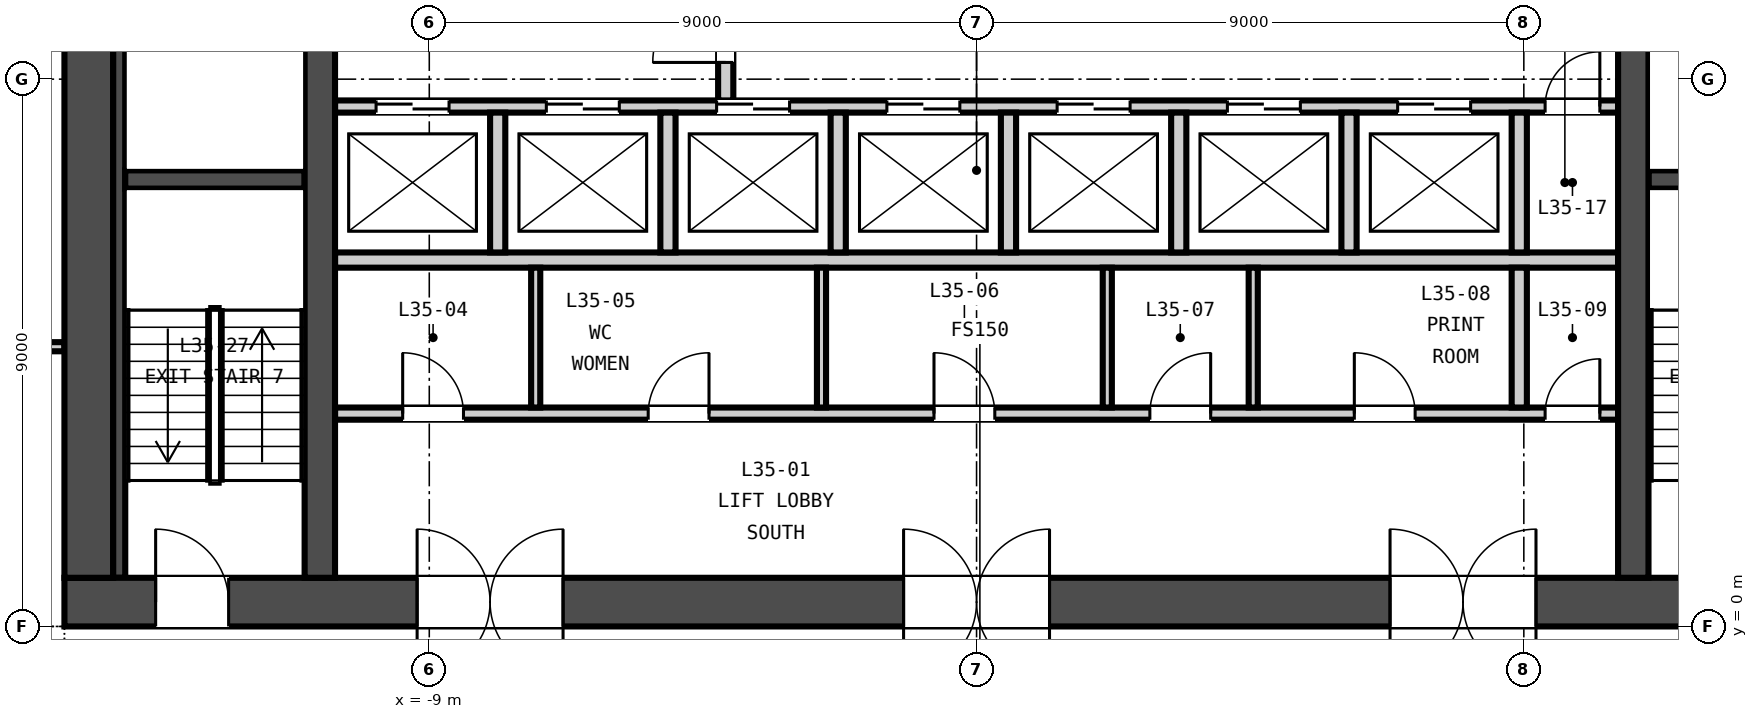
"""IFC4 building model, lengths in metres.
Left out: names, types, materials, properties, quantities, classifications, styles, units other than length and angle.
Written with IfcOpenShell. Run it as: python <this file> out.ifc"""

import sys

from ifc_helpers import new_model, si_unit, direction, frame, frame_2d, origin, place, context, subcontext, project, spatial, rectangle, extrude, element, fill, save


model = new_model("IFC4")
c1 = context("Model", 3, precision=1e-05, world=origin(), true_north=direction((0.0, 1.0)))
c2 = subcontext(c1, "Body", "Model", "MODEL_VIEW")
j1 = project(units=[si_unit("LENGTHUNIT", "METRE"), si_unit("PLANEANGLEUNIT", "RADIAN")], contexts=[c1])
p1 = place(None, origin())
s1 = spatial("IfcSite", under=j1, at=p1, CompositionType="ELEMENT")
p2 = place(p1, origin())
s2 = spatial("IfcBuilding", under=s1, at=p2, CompositionType="ELEMENT")
p3 = place(p2, frame((0.0, 0.0, 144.4)))
s3 = spatial("IfcBuildingStorey", under=s2, at=p3, CompositionType="ELEMENT", Elevation=144.4)
p4 = place(p3, frame((-15.0, 0.4, -0.15), z_axis=(0.0, 0.0, 1.0), x_axis=(1.0, 0.0, 0.0)))
e1 = element("IfcWall", 1, at=p4, inside=s3, PredefinedType="SOLIDWALL", context=c2, shape_type="SweptSolid", body=[
    extrude(rectangle(XDim=30.0, YDim=0.8, at=frame_2d((15.0, 0.0))), origin(), (0.0, 0.0, 1.0), 3.65),
])
p5 = place(p4, frame((5.8, 0.0, 0.15)))
e2 = element("IfcOpeningElement", 2, at=p5, cuts=e1, PredefinedType="OPENING", context=c2, shape_type="SweptSolid", body=[
    extrude(rectangle(XDim=2.4, YDim=2.4, at=frame_2d((1.2, 1.2))), frame((0.0, 0.41, 0.0), z_axis=(0.0, -1.0, 0.0), x_axis=(1.0, 0.0, 0.0)), (0.0, 0.0, 1.0), 0.82),
])
p6 = place(p4, frame((13.8, 0.0, 0.15)))
e3 = element("IfcOpeningElement", 3, at=p6, cuts=e1, PredefinedType="OPENING", context=c2, shape_type="SweptSolid", body=[
    extrude(rectangle(XDim=2.4, YDim=2.4, at=frame_2d((1.2, 1.2))), frame((0.0, 0.41, 0.0), z_axis=(0.0, -1.0, 0.0), x_axis=(1.0, 0.0, 0.0)), (0.0, 0.0, 1.0), 0.82),
])
p7 = place(p4, frame((21.8, 0.0, 0.15)))
e4 = element("IfcOpeningElement", 4, at=p7, cuts=e1, PredefinedType="OPENING", context=c2, shape_type="SweptSolid", body=[
    extrude(rectangle(XDim=2.4, YDim=2.4, at=frame_2d((1.2, 1.2))), frame((0.0, 0.41, 0.0), z_axis=(0.0, -1.0, 0.0), x_axis=(1.0, 0.0, 0.0)), (0.0, 0.0, 1.0), 0.82),
])
p8 = place(p4, frame((1.5, 0.0, 0.15)))
e5 = element("IfcOpeningElement", 5, at=p8, cuts=e1, PredefinedType="OPENING", context=c2, shape_type="SweptSolid", body=[
    extrude(rectangle(XDim=1.2, YDim=2.1, at=frame_2d((0.6, 1.05))), frame((0.0, 0.41, 0.0), z_axis=(0.0, -1.0, 0.0), x_axis=(1.0, 0.0, 0.0)), (0.0, 0.0, 1.0), 0.82),
])
p9 = place(p4, frame((27.3, 0.0, 0.15)))
e6 = element("IfcOpeningElement", 6, at=p9, cuts=e1, PredefinedType="OPENING", context=c2, shape_type="SweptSolid", body=[
    extrude(rectangle(XDim=1.2, YDim=2.1, at=frame_2d((0.6, 1.05))), frame((0.0, 0.41, 0.0), z_axis=(0.0, -1.0, 0.0), x_axis=(1.0, 0.0, 0.0)), (0.0, 0.0, 1.0), 0.82),
])
p10 = place(p3, frame((-14.6, 0.8, -0.15), z_axis=(0.0, 0.0, 1.0), x_axis=(0.0, 1.0, 0.0)))
e7 = element("IfcWall", 7, at=p10, inside=s3, PredefinedType="SOLIDWALL", context=c2, shape_type="SweptSolid", body=[
    extrude(rectangle(XDim=13.4, YDim=0.8, at=frame_2d((6.7, 0.0))), origin(), (0.0, 0.0, 1.0), 3.65),
])
for number, where, z_axis, x_axis in (
    (8, (-10.8, 0.8, -0.15), (0.0, 0.0, 1.0), (0.0, 1.0, 0.0)),
    (9, (10.8, 0.8, -0.15), (0.0, 0.0, 1.0), (0.0, 1.0, 0.0)),
):
    element("IfcWall", number, at=place(p3, frame(where, z_axis=z_axis, x_axis=x_axis)), inside=s3, PredefinedType="SOLIDWALL", context=c2, shape_type="SweptSolid", body=[
        extrude(rectangle(XDim=13.4, YDim=0.5, at=frame_2d((6.7, 0.0))), origin(), (0.0, 0.0, 1.0), 3.65),
    ])
p11 = place(p3, frame((-10.55, 3.5, 0.0), z_axis=(0.0, 0.0, 1.0), x_axis=(1.0, 0.0, 0.0)))
e10 = element("IfcWall", 10, at=p11, inside=s3, PredefinedType="PARTITIONING", context=c2, shape_type="SweptSolid", body=[
    extrude(rectangle(XDim=21.1, YDim=0.2, at=frame_2d((10.55, 0.0))), origin(), (0.0, 0.0, 1.0), 3.5),
])
p12 = place(p11, frame((1.113, 0.0, 0.0)))
e11 = element("IfcOpeningElement", 11, at=p12, cuts=e10, PredefinedType="OPENING", context=c2, shape_type="SweptSolid", body=[
    extrude(rectangle(XDim=1.0, YDim=2.1, at=frame_2d((0.5, 1.05))), frame((0.0, 0.11, 0.0), z_axis=(0.0, -1.0, 0.0), x_axis=(1.0, 0.0, 0.0)), (0.0, 0.0, 1.0), 0.22),
])
p13 = place(p11, frame((5.15, 0.0, 0.0)))
e12 = element("IfcOpeningElement", 12, at=p13, cuts=e10, PredefinedType="OPENING", context=c2, shape_type="SweptSolid", body=[
    extrude(rectangle(XDim=1.0, YDim=2.1, at=frame_2d((0.5, 1.05))), frame((0.0, 0.11, 0.0), z_axis=(0.0, -1.0, 0.0), x_axis=(1.0, 0.0, 0.0)), (0.0, 0.0, 1.0), 0.22),
])
p14 = place(p11, frame((9.85, 0.0, 0.0)))
e13 = element("IfcOpeningElement", 13, at=p14, cuts=e10, PredefinedType="OPENING", context=c2, shape_type="SweptSolid", body=[
    extrude(rectangle(XDim=1.0, YDim=2.1, at=frame_2d((0.5, 1.05))), frame((0.0, 0.11, 0.0), z_axis=(0.0, -1.0, 0.0), x_axis=(1.0, 0.0, 0.0)), (0.0, 0.0, 1.0), 0.22),
])
p15 = place(p11, frame((13.4, 0.0, 0.0)))
e14 = element("IfcOpeningElement", 14, at=p15, cuts=e10, PredefinedType="OPENING", context=c2, shape_type="SweptSolid", body=[
    extrude(rectangle(XDim=1.0, YDim=2.1, at=frame_2d((0.5, 1.05))), frame((0.0, 0.11, 0.0), z_axis=(0.0, -1.0, 0.0), x_axis=(1.0, 0.0, 0.0)), (0.0, 0.0, 1.0), 0.22),
])
p16 = place(p11, frame((16.762, 0.0, 0.0)))
e15 = element("IfcOpeningElement", 15, at=p16, cuts=e10, PredefinedType="OPENING", context=c2, shape_type="SweptSolid", body=[
    extrude(rectangle(XDim=1.0, YDim=2.1, at=frame_2d((0.5, 1.05))), frame((0.0, 0.11, 0.0), z_axis=(0.0, -1.0, 0.0), x_axis=(1.0, 0.0, 0.0)), (0.0, 0.0, 1.0), 0.22),
])
p17 = place(p11, frame((19.9, 0.0, 0.0)))
e16 = element("IfcOpeningElement", 16, at=p17, cuts=e10, PredefinedType="OPENING", context=c2, shape_type="SweptSolid", body=[
    extrude(rectangle(XDim=0.9, YDim=2.1, at=frame_2d((0.45, 1.05))), frame((0.0, 0.11, 0.0), z_axis=(0.0, -1.0, 0.0), x_axis=(1.0, 0.0, 0.0)), (0.0, 0.0, 1.0), 0.22),
])
p18 = place(p3, frame((-10.55, 6.025, 0.0), z_axis=(0.0, 0.0, 1.0), x_axis=(1.0, 0.0, 0.0)))
e17 = element("IfcWall", 17, at=p18, inside=s3, PredefinedType="PARTITIONING", context=c2, shape_type="SweptSolid", body=[
    extrude(rectangle(XDim=21.1, YDim=0.25, at=frame_2d((10.55, 0.0))), origin(), (0.0, 0.0, 1.0), 3.5),
])
p19 = place(p3, frame((-10.55, 8.55, 0.0), z_axis=(0.0, 0.0, 1.0), x_axis=(1.0, 0.0, 0.0)))
e18 = element("IfcWall", 18, at=p19, inside=s3, PredefinedType="PARTITIONING", context=c2, shape_type="SweptSolid", body=[
    extrude(rectangle(XDim=21.1, YDim=0.2, at=frame_2d((10.55, 0.0))), origin(), (0.0, 0.0, 1.0), 3.5),
])
p20 = place(p19, frame((0.675, 0.0, 0.0)))
e19 = element("IfcOpeningElement", 19, at=p20, cuts=e18, PredefinedType="OPENING", context=c2, shape_type="SweptSolid", body=[
    extrude(rectangle(XDim=1.2, YDim=2.1, at=frame_2d((0.6, 1.05))), frame((0.0, 0.11, 0.0), z_axis=(0.0, -1.0, 0.0), x_axis=(1.0, 0.0, 0.0)), (0.0, 0.0, 1.0), 0.22),
])
p21 = place(p19, frame((3.475, 0.0, 0.0)))
e20 = element("IfcOpeningElement", 20, at=p21, cuts=e18, PredefinedType="OPENING", context=c2, shape_type="SweptSolid", body=[
    extrude(rectangle(XDim=1.2, YDim=2.1, at=frame_2d((0.6, 1.05))), frame((0.0, 0.11, 0.0), z_axis=(0.0, -1.0, 0.0), x_axis=(1.0, 0.0, 0.0)), (0.0, 0.0, 1.0), 0.22),
])
p22 = place(p19, frame((6.275, 0.0, 0.0)))
e21 = element("IfcOpeningElement", 21, at=p22, cuts=e18, PredefinedType="OPENING", context=c2, shape_type="SweptSolid", body=[
    extrude(rectangle(XDim=1.2, YDim=2.1, at=frame_2d((0.6, 1.05))), frame((0.0, 0.11, 0.0), z_axis=(0.0, -1.0, 0.0), x_axis=(1.0, 0.0, 0.0)), (0.0, 0.0, 1.0), 0.22),
])
p23 = place(p19, frame((9.075, 0.0, 0.0)))
e22 = element("IfcOpeningElement", 22, at=p23, cuts=e18, PredefinedType="OPENING", context=c2, shape_type="SweptSolid", body=[
    extrude(rectangle(XDim=1.2, YDim=2.1, at=frame_2d((0.6, 1.05))), frame((0.0, 0.11, 0.0), z_axis=(0.0, -1.0, 0.0), x_axis=(1.0, 0.0, 0.0)), (0.0, 0.0, 1.0), 0.22),
])
p24 = place(p19, frame((11.875, 0.0, 0.0)))
e23 = element("IfcOpeningElement", 23, at=p24, cuts=e18, PredefinedType="OPENING", context=c2, shape_type="SweptSolid", body=[
    extrude(rectangle(XDim=1.2, YDim=2.1, at=frame_2d((0.6, 1.05))), frame((0.0, 0.11, 0.0), z_axis=(0.0, -1.0, 0.0), x_axis=(1.0, 0.0, 0.0)), (0.0, 0.0, 1.0), 0.22),
])
p25 = place(p19, frame((14.675, 0.0, 0.0)))
e24 = element("IfcOpeningElement", 24, at=p25, cuts=e18, PredefinedType="OPENING", context=c2, shape_type="SweptSolid", body=[
    extrude(rectangle(XDim=1.2, YDim=2.1, at=frame_2d((0.6, 1.05))), frame((0.0, 0.11, 0.0), z_axis=(0.0, -1.0, 0.0), x_axis=(1.0, 0.0, 0.0)), (0.0, 0.0, 1.0), 0.22),
])
p26 = place(p19, frame((17.475, 0.0, 0.0)))
e25 = element("IfcOpeningElement", 25, at=p26, cuts=e18, PredefinedType="OPENING", context=c2, shape_type="SweptSolid", body=[
    extrude(rectangle(XDim=1.2, YDim=2.1, at=frame_2d((0.6, 1.05))), frame((0.0, 0.11, 0.0), z_axis=(0.0, -1.0, 0.0), x_axis=(1.0, 0.0, 0.0)), (0.0, 0.0, 1.0), 0.22),
])
p27 = place(p19, frame((19.9, 0.0, 0.0)))
e26 = element("IfcOpeningElement", 26, at=p27, cuts=e18, PredefinedType="OPENING", context=c2, shape_type="SweptSolid", body=[
    extrude(rectangle(XDim=0.9, YDim=2.1, at=frame_2d((0.45, 1.05))), frame((0.0, 0.11, 0.0), z_axis=(0.0, -1.0, 0.0), x_axis=(1.0, 0.0, 0.0)), (0.0, 0.0, 1.0), 0.22),
])
p28 = place(p3, frame((-4.125, 8.65, 0.0), z_axis=(0.0, 0.0, 1.0), x_axis=(0.0, 1.0, 0.0)))
e27 = element("IfcWall", 27, at=p28, inside=s3, PredefinedType="PARTITIONING", context=c2, shape_type="SweptSolid", body=[
    extrude(rectangle(XDim=2.45, YDim=0.25, at=frame_2d((1.225, 0.0))), origin(), (0.0, 0.0, 1.0), 3.5),
])
p29 = place(p28, frame((0.625, 0.0, 0.0)))
e28 = element("IfcOpeningElement", 28, at=p29, cuts=e27, PredefinedType="OPENING", context=c2, shape_type="SweptSolid", body=[
    extrude(rectangle(XDim=1.2, YDim=2.1, at=frame_2d((0.6, 1.05))), frame((0.0, 0.135, 0.0), z_axis=(0.0, -1.0, 0.0), x_axis=(1.0, 0.0, 0.0)), (0.0, 0.0, 1.0), 0.27),
])
for number, where, z_axis, x_axis in (
    (29, (-7.25, 3.6, 0.0), (0.0, 0.0, 1.0), (0.0, 1.0, 0.0)),
    (30, (-2.55, 3.6, 0.0), (0.0, 0.0, 1.0), (0.0, 1.0, 0.0)),
    (31, (2.15, 3.6, 0.0), (0.0, 0.0, 1.0), (0.0, 1.0, 0.0)),
    (32, (4.55, 3.6, 0.0), (0.0, 0.0, 1.0), (0.0, 1.0, 0.0)),
):
    element("IfcWall", number, at=place(p3, frame(where, z_axis=z_axis, x_axis=x_axis)), inside=s3, PredefinedType="PARTITIONING", context=c2, shape_type="SweptSolid", body=[
        extrude(rectangle(XDim=2.3, YDim=0.15, at=frame_2d((1.15, 0.0))), origin(), (0.0, 0.0, 1.0), 3.5),
    ])
p30 = place(p3, frame((8.925, 3.6, 0.0), z_axis=(0.0, 0.0, 1.0), x_axis=(0.0, 1.0, 0.0)))
e33 = element("IfcWall", 33, at=p30, inside=s3, PredefinedType="PARTITIONING", context=c2, shape_type="SweptSolid", body=[
    extrude(rectangle(XDim=2.3, YDim=0.25, at=frame_2d((1.15, 0.0))), origin(), (0.0, 0.0, 1.0), 3.5),
])
for number, where, z_axis, x_axis in (
    (34, (-7.875, 6.15, 0.0), (0.0, 0.0, 1.0), (0.0, 1.0, 0.0)),
    (35, (-5.075, 6.15, 0.0), (0.0, 0.0, 1.0), (0.0, 1.0, 0.0)),
    (36, (-2.275, 6.15, 0.0), (0.0, 0.0, 1.0), (0.0, 1.0, 0.0)),
    (37, (0.525, 6.15, 0.0), (0.0, 0.0, 1.0), (0.0, 1.0, 0.0)),
    (38, (3.325, 6.15, 0.0), (0.0, 0.0, 1.0), (0.0, 1.0, 0.0)),
    (39, (6.125, 6.15, 0.0), (0.0, 0.0, 1.0), (0.0, 1.0, 0.0)),
    (40, (8.925, 6.15, 0.0), (0.0, 0.0, 1.0), (0.0, 1.0, 0.0)),
):
    element("IfcWall", number, at=place(p3, frame(where, z_axis=z_axis, x_axis=x_axis)), inside=s3, PredefinedType="PARTITIONING", context=c2, shape_type="SweptSolid", body=[
        extrude(rectangle(XDim=2.3, YDim=0.25, at=frame_2d((1.15, 0.0))), origin(), (0.0, 0.0, 1.0), 3.5),
    ])
p31 = place(p3, frame((-14.0, 7.35, 0.0), z_axis=(0.0, 0.0, 1.0), x_axis=(1.0, 0.0, 0.0)))
e41 = element("IfcWall", 41, at=p31, inside=s3, PredefinedType="SOLIDWALL", context=c2, shape_type="SweptSolid", body=[
    extrude(rectangle(XDim=2.95, YDim=0.3, at=frame_2d((1.475, 0.0))), origin(), (0.0, 0.0, 1.0), 3.5),
])
p32 = place(p3, frame((-14.1, 0.8, 0.0), z_axis=(0.0, 0.0, 1.0), x_axis=(0.0, 1.0, 0.0)))
e42 = element("IfcWall", 42, at=p32, inside=s3, PredefinedType="SOLIDWALL", context=c2, shape_type="SweptSolid", body=[
    extrude(rectangle(XDim=13.4, YDim=0.2, at=frame_2d((6.7, 0.0))), origin(), (0.0, 0.0, 1.0), 3.5),
])
p33 = place(p3, frame((11.05, 7.35, 0.0), z_axis=(0.0, 0.0, 1.0), x_axis=(1.0, 0.0, 0.0)))
e43 = element("IfcWall", 43, at=p33, inside=s3, PredefinedType="SOLIDWALL", context=c2, shape_type="SweptSolid", body=[
    extrude(rectangle(XDim=2.95, YDim=0.3, at=frame_2d((1.475, 0.0))), origin(), (0.0, 0.0, 1.0), 3.5),
])
p34 = place(p3, frame((-18.533, 4.6, 0.0), z_axis=(0.0, 0.0, 1.0), x_axis=(1.0, 0.0, 0.0)))
e44 = element("IfcWall", 44, at=p34, inside=s3, PredefinedType="PARTITIONING", context=c2, shape_type="SweptSolid", body=[
    extrude(rectangle(XDim=3.533, YDim=0.15, at=frame_2d((1.767, 0.0))), origin(), (0.0, 0.0, 1.0), 2.741),
])
p35 = place(p29, origin())
e45 = element("IfcDoor", 45, at=p35, inside=s3, OperationType="SINGLE_SWING_LEFT", PredefinedType="DOOR", context=c2, shape_type="SweptSolid", body=[
    extrude(rectangle(XDim=1.2, YDim=2.1, at=frame_2d((0.6, 1.05))), frame((0.0, 0.025, 0.0), z_axis=(0.0, -1.0, 0.0), x_axis=(1.0, 0.0, 0.0)), (0.0, 0.0, 1.0), 0.05),
])
fill(e28, e45)
p36 = place(p12, origin())
e46 = element("IfcDoor", 46, at=p36, inside=s3, OperationType="SINGLE_SWING_LEFT", PredefinedType="DOOR", context=c2, shape_type="SweptSolid", body=[
    extrude(rectangle(XDim=1.0, YDim=2.1, at=frame_2d((0.5, 1.05))), frame((0.0, 0.025, 0.0), z_axis=(0.0, -1.0, 0.0), x_axis=(1.0, 0.0, 0.0)), (0.0, 0.0, 1.0), 0.05),
])
fill(e11, e46)
p37 = place(p13, origin())
e47 = element("IfcDoor", 47, at=p37, inside=s3, OperationType="SINGLE_SWING_RIGHT", PredefinedType="DOOR", context=c2, shape_type="SweptSolid", body=[
    extrude(rectangle(XDim=1.0, YDim=2.1, at=frame_2d((0.5, 1.05))), frame((0.0, 0.025, 0.0), z_axis=(0.0, -1.0, 0.0), x_axis=(1.0, 0.0, 0.0)), (0.0, 0.0, 1.0), 0.05),
])
fill(e12, e47)
p38 = place(p14, origin())
e48 = element("IfcDoor", 48, at=p38, inside=s3, OperationType="SINGLE_SWING_LEFT", PredefinedType="DOOR", context=c2, shape_type="SweptSolid", body=[
    extrude(rectangle(XDim=1.0, YDim=2.1, at=frame_2d((0.5, 1.05))), frame((0.0, 0.025, 0.0), z_axis=(0.0, -1.0, 0.0), x_axis=(1.0, 0.0, 0.0)), (0.0, 0.0, 1.0), 0.05),
])
fill(e13, e48)
p39 = place(p15, origin())
e49 = element("IfcDoor", 49, at=p39, inside=s3, OperationType="SINGLE_SWING_RIGHT", PredefinedType="DOOR", context=c2, shape_type="SweptSolid", body=[
    extrude(rectangle(XDim=1.0, YDim=2.1, at=frame_2d((0.5, 1.05))), frame((0.0, 0.025, 0.0), z_axis=(0.0, -1.0, 0.0), x_axis=(1.0, 0.0, 0.0)), (0.0, 0.0, 1.0), 0.05),
])
fill(e14, e49)
p40 = place(p16, origin())
e50 = element("IfcDoor", 50, at=p40, inside=s3, OperationType="SINGLE_SWING_LEFT", PredefinedType="DOOR", context=c2, shape_type="SweptSolid", body=[
    extrude(rectangle(XDim=1.0, YDim=2.1, at=frame_2d((0.5, 1.05))), frame((0.0, 0.025, 0.0), z_axis=(0.0, -1.0, 0.0), x_axis=(1.0, 0.0, 0.0)), (0.0, 0.0, 1.0), 0.05),
])
fill(e15, e50)
p41 = place(p17, origin())
e51 = element("IfcDoor", 51, at=p41, inside=s3, OperationType="SINGLE_SWING_RIGHT", PredefinedType="DOOR", context=c2, shape_type="SweptSolid", body=[
    extrude(rectangle(XDim=0.9, YDim=2.1, at=frame_2d((0.45, 1.05))), frame((0.0, 0.025, 0.0), z_axis=(0.0, -1.0, 0.0), x_axis=(1.0, 0.0, 0.0)), (0.0, 0.0, 1.0), 0.05),
])
fill(e16, e51)
p42 = place(p20, origin())
e52 = element("IfcDoor", 52, at=p42, inside=s3, OperationType="DOUBLE_DOOR_SLIDING", PredefinedType="DOOR", context=c2, shape_type="SweptSolid", body=[
    extrude(rectangle(XDim=1.2, YDim=2.1, at=frame_2d((0.6, 1.05))), frame((0.0, 0.025, 0.0), z_axis=(0.0, -1.0, 0.0), x_axis=(1.0, 0.0, 0.0)), (0.0, 0.0, 1.0), 0.05),
])
fill(e19, e52)
p43 = place(p21, origin())
e53 = element("IfcDoor", 53, at=p43, inside=s3, OperationType="DOUBLE_DOOR_SLIDING", PredefinedType="DOOR", context=c2, shape_type="SweptSolid", body=[
    extrude(rectangle(XDim=1.2, YDim=2.1, at=frame_2d((0.6, 1.05))), frame((0.0, 0.025, 0.0), z_axis=(0.0, -1.0, 0.0), x_axis=(1.0, 0.0, 0.0)), (0.0, 0.0, 1.0), 0.05),
])
fill(e20, e53)
p44 = place(p22, origin())
e54 = element("IfcDoor", 54, at=p44, inside=s3, OperationType="DOUBLE_DOOR_SLIDING", PredefinedType="DOOR", context=c2, shape_type="SweptSolid", body=[
    extrude(rectangle(XDim=1.2, YDim=2.1, at=frame_2d((0.6, 1.05))), frame((0.0, 0.025, 0.0), z_axis=(0.0, -1.0, 0.0), x_axis=(1.0, 0.0, 0.0)), (0.0, 0.0, 1.0), 0.05),
])
fill(e21, e54)
p45 = place(p23, origin())
e55 = element("IfcDoor", 55, at=p45, inside=s3, OperationType="DOUBLE_DOOR_SLIDING", PredefinedType="DOOR", context=c2, shape_type="SweptSolid", body=[
    extrude(rectangle(XDim=1.2, YDim=2.1, at=frame_2d((0.6, 1.05))), frame((0.0, 0.025, 0.0), z_axis=(0.0, -1.0, 0.0), x_axis=(1.0, 0.0, 0.0)), (0.0, 0.0, 1.0), 0.05),
])
fill(e22, e55)
p46 = place(p24, origin())
e56 = element("IfcDoor", 56, at=p46, inside=s3, OperationType="DOUBLE_DOOR_SLIDING", PredefinedType="DOOR", context=c2, shape_type="SweptSolid", body=[
    extrude(rectangle(XDim=1.2, YDim=2.1, at=frame_2d((0.6, 1.05))), frame((0.0, 0.025, 0.0), z_axis=(0.0, -1.0, 0.0), x_axis=(1.0, 0.0, 0.0)), (0.0, 0.0, 1.0), 0.05),
])
fill(e23, e56)
p47 = place(p25, origin())
e57 = element("IfcDoor", 57, at=p47, inside=s3, OperationType="DOUBLE_DOOR_SLIDING", PredefinedType="DOOR", context=c2, shape_type="SweptSolid", body=[
    extrude(rectangle(XDim=1.2, YDim=2.1, at=frame_2d((0.6, 1.05))), frame((0.0, 0.025, 0.0), z_axis=(0.0, -1.0, 0.0), x_axis=(1.0, 0.0, 0.0)), (0.0, 0.0, 1.0), 0.05),
])
fill(e24, e57)
p48 = place(p26, origin())
e58 = element("IfcDoor", 58, at=p48, inside=s3, OperationType="DOUBLE_DOOR_SLIDING", PredefinedType="DOOR", context=c2, shape_type="SweptSolid", body=[
    extrude(rectangle(XDim=1.2, YDim=2.1, at=frame_2d((0.6, 1.05))), frame((0.0, 0.025, 0.0), z_axis=(0.0, -1.0, 0.0), x_axis=(1.0, 0.0, 0.0)), (0.0, 0.0, 1.0), 0.05),
])
fill(e25, e58)
p49 = place(p27, origin())
e59 = element("IfcDoor", 59, at=p49, inside=s3, OperationType="SINGLE_SWING_RIGHT", PredefinedType="DOOR", context=c2, shape_type="SweptSolid", body=[
    extrude(rectangle(XDim=0.9, YDim=2.1, at=frame_2d((0.45, 1.05))), frame((0.0, 0.025, 0.0), z_axis=(0.0, -1.0, 0.0), x_axis=(1.0, 0.0, 0.0)), (0.0, 0.0, 1.0), 0.05),
])
fill(e26, e59)
p50 = place(p5, origin())
e60 = element("IfcDoor", 60, at=p50, inside=s3, OperationType="DOUBLE_DOOR_DOUBLE_SWING", PredefinedType="DOOR", context=c2, shape_type="SweptSolid", body=[
    extrude(rectangle(XDim=2.4, YDim=2.4, at=frame_2d((1.2, 1.2))), frame((0.0, 0.025, 0.0), z_axis=(0.0, -1.0, 0.0), x_axis=(1.0, 0.0, 0.0)), (0.0, 0.0, 1.0), 0.05),
])
fill(e2, e60)
p51 = place(p6, origin())
e61 = element("IfcDoor", 61, at=p51, inside=s3, OperationType="DOUBLE_DOOR_DOUBLE_SWING", PredefinedType="DOOR", context=c2, shape_type="SweptSolid", body=[
    extrude(rectangle(XDim=2.4, YDim=2.4, at=frame_2d((1.2, 1.2))), frame((0.0, 0.025, 0.0), z_axis=(0.0, -1.0, 0.0), x_axis=(1.0, 0.0, 0.0)), (0.0, 0.0, 1.0), 0.05),
])
fill(e3, e61)
p52 = place(p7, origin())
e62 = element("IfcDoor", 62, at=p52, inside=s3, OperationType="DOUBLE_DOOR_DOUBLE_SWING", PredefinedType="DOOR", context=c2, shape_type="SweptSolid", body=[
    extrude(rectangle(XDim=2.4, YDim=2.4, at=frame_2d((1.2, 1.2))), frame((0.0, 0.025, 0.0), z_axis=(0.0, -1.0, 0.0), x_axis=(1.0, 0.0, 0.0)), (0.0, 0.0, 1.0), 0.05),
])
fill(e4, e62)
p53 = place(p8, origin())
e63 = element("IfcDoor", 63, at=p53, inside=s3, OperationType="SINGLE_SWING_LEFT", PredefinedType="DOOR", context=c2, shape_type="SweptSolid", body=[
    extrude(rectangle(XDim=1.2, YDim=2.1, at=frame_2d((0.6, 1.05))), frame((0.0, 0.025, 0.0), z_axis=(0.0, -1.0, 0.0), x_axis=(1.0, 0.0, 0.0)), (0.0, 0.0, 1.0), 0.05),
])
fill(e5, e63)
save(model, sys.argv[1])
